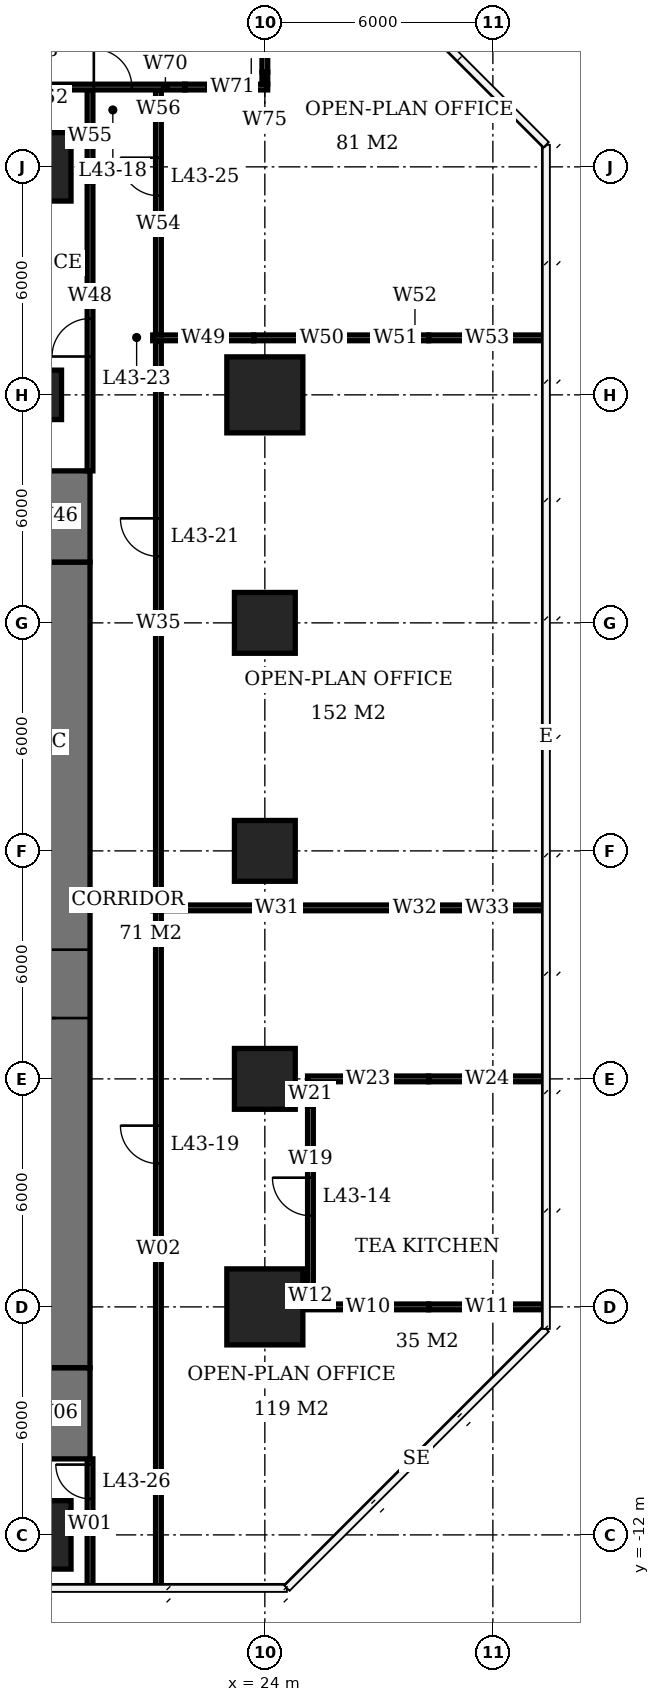
"""IFC4 building model, lengths in metres.
Left out: names, types, materials, properties, quantities, classifications, styles, units other than length and angle.
Written with IfcOpenShell. Run it as: python <this file> out.ifc"""

import sys

from ifc_helpers import new_model, si_unit, direction, frame, frame_2d, origin, origin_2d, place, context, subcontext, project, spatial, rectangle, extrude, element, fill, save


model = new_model("IFC4")
c1 = context("Model", 3, precision=1e-05, world=origin(), true_north=direction((0.0, 1.0)))
c2 = subcontext(c1, "Body", "Model", "MODEL_VIEW")
j1 = project(units=[si_unit("LENGTHUNIT", "METRE"), si_unit("PLANEANGLEUNIT", "RADIAN")], contexts=[c1])
p1 = place(None, origin())
s1 = spatial("IfcSite", under=j1, at=p1, CompositionType="ELEMENT")
p2 = place(p1, origin())
s2 = spatial("IfcBuilding", under=s1, at=p2, CompositionType="ELEMENT")
p3 = place(p2, frame((0.0, 0.0, 177.2)))
s3 = spatial("IfcBuildingStorey", under=s2, at=p3, CompositionType="ELEMENT", Elevation=177.2)
p4 = place(p3, frame((18.0, -12.0, 0.0), z_axis=(0.0, 0.0, 1.0), x_axis=(1.0, 0.0, 0.0)))
e1 = element("IfcColumn", 1, at=p4, inside=s3, PredefinedType="COLUMN", context=c2, shape_type="SweptSolid", body=[
    extrude(rectangle(XDim=1.8, YDim=1.8, at=origin_2d()), origin(), (0.0, 0.0, 1.0), 3.9),
])
p5 = place(p3, frame((18.0, 18.0, 0.0), z_axis=(0.0, 0.0, 1.0), x_axis=(1.0, 0.0, 0.0)))
e2 = element("IfcColumn", 2, at=p5, inside=s3, PredefinedType="COLUMN", context=c2, shape_type="SweptSolid", body=[
    extrude(rectangle(XDim=1.3, YDim=1.3, at=origin_2d()), origin(), (0.0, 0.0, 1.0), 3.9),
])
p6 = place(p3, frame((18.0, 24.0, 0.0), z_axis=(0.0, 0.0, 1.0), x_axis=(1.0, 0.0, 0.0)))
e3 = element("IfcColumn", 3, at=p6, inside=s3, PredefinedType="COLUMN", context=c2, shape_type="SweptSolid", body=[
    extrude(rectangle(XDim=1.8, YDim=1.8, at=origin_2d()), origin(), (0.0, 0.0, 1.0), 3.9),
])
p7 = place(p3, frame((24.0, -6.0, 0.0), z_axis=(0.0, 0.0, 1.0), x_axis=(1.0, 0.0, 0.0)))
e4 = element("IfcColumn", 4, at=p7, inside=s3, PredefinedType="COLUMN", context=c2, shape_type="SweptSolid", body=[
    extrude(rectangle(XDim=2.0, YDim=2.0, at=origin_2d()), origin(), (0.0, 0.0, 1.0), 3.9),
])
for number, where, z_axis, x_axis in (
    (5, (24.0, 0.0, 0.0), (0.0, 0.0, 1.0), (1.0, 0.0, 0.0)),
    (6, (24.0, 6.0, 0.0), (0.0, 0.0, 1.0), (1.0, 0.0, 0.0)),
    (7, (24.0, 12.0, 0.0), (0.0, 0.0, 1.0), (1.0, 0.0, 0.0)),
):
    element("IfcColumn", number, at=place(p3, frame(where, z_axis=z_axis, x_axis=x_axis)), inside=s3, PredefinedType="COLUMN", context=c2, shape_type="SweptSolid", body=[
        extrude(rectangle(XDim=1.6, YDim=1.6, at=origin_2d()), origin(), (0.0, 0.0, 1.0), 3.9),
    ])
p8 = place(p3, frame((24.0, 18.0, 0.0), z_axis=(0.0, 0.0, 1.0), x_axis=(1.0, 0.0, 0.0)))
e8 = element("IfcColumn", 8, at=p8, inside=s3, PredefinedType="COLUMN", context=c2, shape_type="SweptSolid", body=[
    extrude(rectangle(XDim=2.0, YDim=2.0, at=origin_2d()), origin(), (0.0, 0.0, 1.0), 3.9),
])
p9 = place(p3, frame((18.5, -7.6, 0.0), z_axis=(0.0, 0.0, 1.0), x_axis=(0.0, 1.0, 0.0)))
e9 = element("IfcWall", 9, at=p9, inside=s3, PredefinedType="SHEAR", context=c2, shape_type="SweptSolid", body=[
    extrude(rectangle(XDim=21.2, YDim=1.8, at=frame_2d((10.6, 0.0))), origin(), (0.0, 0.0, 1.0), 3.9),
])
p10 = place(p9, frame((9.2, 0.0, 0.0)))
e10 = element("IfcOpeningElement", 10, at=p10, cuts=e9, PredefinedType="OPENING", context=c2, shape_type="SweptSolid", body=[
    extrude(rectangle(XDim=1.8, YDim=2.4, at=frame_2d((0.9, 1.2))), frame((0.0, 0.91, 0.0), z_axis=(0.0, -1.0, 0.0), x_axis=(1.0, 0.0, 0.0)), (0.0, 0.0, 1.0), 1.82),
])
for number, where, z_axis, x_axis in (
    (11, (18.5, -10.0, 0.0), (0.0, 0.0, 1.0), (0.0, 1.0, 0.0)),
    (12, (18.5, 13.6, 0.0), (0.0, 0.0, 1.0), (0.0, 1.0, 0.0)),
):
    element("IfcWall", number, at=place(p3, frame(where, z_axis=z_axis, x_axis=x_axis)), inside=s3, PredefinedType="SHEAR", context=c2, shape_type="SweptSolid", body=[
        extrude(rectangle(XDim=2.4, YDim=1.8, at=frame_2d((1.2, 0.0))), origin(), (0.0, 0.0, 1.0), 3.9),
    ])
p11 = place(p3, frame((25.125, -6.0, 0.0), z_axis=(0.0, 0.0, 1.0), x_axis=(1.0, 0.0, 0.0)))
e13 = element("IfcWall", 13, at=p11, inside=s3, PredefinedType="PARTITIONING", context=c2, shape_type="SweptSolid", body=[
    extrude(rectangle(XDim=3.185, YDim=0.15, at=frame_2d((1.593, 0.0))), origin(), (0.0, 0.0, 1.0), 2.65),
])
p12 = place(p3, frame((28.31, -6.0, 0.0), z_axis=(0.0, 0.0, 1.0), x_axis=(1.0, 0.0, 0.0)))
e14 = element("IfcWall", 14, at=p12, inside=s3, PredefinedType="PARTITIONING", context=c2, shape_type="SweptSolid", body=[
    extrude(rectangle(XDim=3.09, YDim=0.15, at=frame_2d((1.545, 0.0))), origin(), (0.0, 0.0, 1.0), 3.65),
])
p13 = place(p3, frame((25.125, 0.0, 0.0), z_axis=(0.0, 0.0, 1.0), x_axis=(1.0, 0.0, 0.0)))
e15 = element("IfcWall", 15, at=p13, inside=s3, PredefinedType="PARTITIONING", context=c2, shape_type="SweptSolid", body=[
    extrude(rectangle(XDim=3.185, YDim=0.15, at=frame_2d((1.593, 0.0))), origin(), (0.0, 0.0, 1.0), 2.65),
])
p14 = place(p3, frame((28.31, 0.0, 0.0), z_axis=(0.0, 0.0, 1.0), x_axis=(1.0, 0.0, 0.0)))
e16 = element("IfcWall", 16, at=p14, inside=s3, PredefinedType="PARTITIONING", context=c2, shape_type="SweptSolid", body=[
    extrude(rectangle(XDim=3.09, YDim=0.15, at=frame_2d((1.545, 0.0))), origin(), (0.0, 0.0, 1.0), 3.65),
])
p15 = place(p3, frame((18.075, 26.1, 0.0), z_axis=(0.0, 0.0, 1.0), x_axis=(1.0, 0.0, 0.0)))
e17 = element("IfcWall", 17, at=p15, inside=s3, PredefinedType="PARTITIONING", context=c2, shape_type="SweptSolid", body=[
    extrude(rectangle(XDim=3.817, YDim=0.15, at=frame_2d((1.909, 0.0))), origin(), (0.0, 0.0, 1.0), 2.65),
])
p16 = place(p15, frame((1.425, 0.0, 0.0)))
e18 = element("IfcOpeningElement", 18, at=p16, cuts=e17, PredefinedType="OPENING", context=c2, shape_type="SweptSolid", body=[
    extrude(rectangle(XDim=1.0, YDim=2.1, at=frame_2d((0.5, 1.05))), frame((0.0, 0.085, 0.0), z_axis=(0.0, -1.0, 0.0), x_axis=(1.0, 0.0, 0.0)), (0.0, 0.0, 1.0), 0.17),
])
p17 = place(p3, frame((21.892, 26.1, 0.0), z_axis=(0.0, 0.0, 1.0), x_axis=(1.0, 0.0, 0.0)))
e19 = element("IfcWall", 19, at=p17, inside=s3, PredefinedType="PARTITIONING", context=c2, shape_type="SweptSolid", body=[
    extrude(rectangle(XDim=1.318, YDim=0.15, at=frame_2d((0.659, 0.0))), origin(), (0.0, 0.0, 1.0), 3.65),
])
p18 = place(p3, frame((23.21, 26.1, 0.0), z_axis=(0.0, 0.0, 1.0), x_axis=(1.0, 0.0, 0.0)))
e20 = element("IfcWall", 20, at=p18, inside=s3, PredefinedType="PARTITIONING", context=c2, shape_type="SweptSolid", body=[
    extrude(rectangle(XDim=0.865, YDim=0.15, at=frame_2d((0.433, 0.0))), origin(), (0.0, 0.0, 1.0), 2.65),
])
p19 = place(p3, frame((24.0, 26.175, 0.0), z_axis=(0.0, 0.0, 1.0), x_axis=(0.0, 1.0, 0.0)))
e21 = element("IfcWall", 21, at=p19, inside=s3, PredefinedType="PARTITIONING", context=c2, shape_type="SweptSolid", body=[
    extrude(rectangle(XDim=0.315, YDim=0.15, at=frame_2d((0.157, 0.0))), origin(), (0.0, 0.0, 1.0), 2.65),
])
p20 = place(p3, frame((24.0, 26.49, 0.0), z_axis=(0.0, 0.0, 1.0), x_axis=(0.0, 1.0, 0.0)))
e22 = element("IfcWall", 22, at=p20, inside=s3, PredefinedType="PARTITIONING", context=c2, shape_type="SweptSolid", body=[
    extrude(rectangle(XDim=1.718, YDim=0.15, at=frame_2d((0.859, 0.0))), origin(), (0.0, 0.0, 1.0), 3.65),
])
p21 = place(p3, frame((25.2, -5.925, 0.0), z_axis=(0.0, 0.0, 1.0), x_axis=(0.0, 1.0, 0.0)))
e23 = element("IfcWall", 23, at=p21, inside=s3, PredefinedType="PARTITIONING", context=c2, shape_type="SweptSolid", body=[
    extrude(rectangle(XDim=0.435, YDim=0.15, at=frame_2d((0.218, 0.0))), origin(), (0.0, 0.0, 1.0), 2.65),
])
p22 = place(p3, frame((25.2, -5.49, 0.0), z_axis=(0.0, 0.0, 1.0), x_axis=(0.0, 1.0, 0.0)))
e24 = element("IfcWall", 24, at=p22, inside=s3, PredefinedType="PARTITIONING", context=c2, shape_type="SweptSolid", body=[
    extrude(rectangle(XDim=4.78, YDim=0.15, at=frame_2d((2.39, 0.0))), origin(), (0.0, 0.0, 1.0), 3.65),
])
p23 = place(p22, frame((1.89, 0.0, 0.0)))
e25 = element("IfcOpeningElement", 25, at=p23, cuts=e24, PredefinedType="OPENING", context=c2, shape_type="SweptSolid", body=[
    extrude(rectangle(XDim=1.0, YDim=2.1, at=frame_2d((0.5, 1.05))), frame((0.0, 0.085, 0.0), z_axis=(0.0, -1.0, 0.0), x_axis=(1.0, 0.0, 0.0)), (0.0, 0.0, 1.0), 0.17),
])
p24 = place(p3, frame((25.2, -0.71, 0.0), z_axis=(0.0, 0.0, 1.0), x_axis=(0.0, 1.0, 0.0)))
e26 = element("IfcWall", 26, at=p24, inside=s3, PredefinedType="PARTITIONING", context=c2, shape_type="SweptSolid", body=[
    extrude(rectangle(XDim=0.635, YDim=0.15, at=frame_2d((0.317, 0.0))), origin(), (0.0, 0.0, 1.0), 2.65),
])
p25 = place(p3, frame((19.4, -13.4, 0.0), z_axis=(0.0, 0.0, 1.0), x_axis=(0.0, 1.0, 0.0)))
e27 = element("IfcWall", 27, at=p25, inside=s3, PredefinedType="PARTITIONING", context=c2, shape_type="SweptSolid", body=[
    extrude(rectangle(XDim=3.4, YDim=0.15, at=frame_2d((1.7, 0.0))), origin(), (0.0, 0.0, 1.0), 3.65),
])
p26 = place(p25, frame((2.35, 0.0, 0.0)))
e28 = element("IfcOpeningElement", 28, at=p26, cuts=e27, PredefinedType="OPENING", context=c2, shape_type="SweptSolid", body=[
    extrude(rectangle(XDim=0.9, YDim=2.1, at=frame_2d((0.45, 1.05))), frame((0.0, 0.085, 0.0), z_axis=(0.0, -1.0, 0.0), x_axis=(1.0, 0.0, 0.0)), (0.0, 0.0, 1.0), 0.17),
])
p27 = place(p3, frame((19.4, 16.0, 0.0), z_axis=(0.0, 0.0, 1.0), x_axis=(0.0, 1.0, 0.0)))
e29 = element("IfcWall", 29, at=p27, inside=s3, PredefinedType="PARTITIONING", context=c2, shape_type="SweptSolid", body=[
    extrude(rectangle(XDim=7.608, YDim=0.15, at=frame_2d((3.804, 0.0))), origin(), (0.0, 0.0, 1.0), 3.65),
])
p28 = place(p27, frame((3.009, 0.0, 0.0)))
e30 = element("IfcOpeningElement", 30, at=p28, cuts=e29, PredefinedType="OPENING", context=c2, shape_type="SweptSolid", body=[
    extrude(rectangle(XDim=1.0, YDim=2.1, at=frame_2d((0.5, 1.05))), frame((0.0, 0.085, 0.0), z_axis=(0.0, -1.0, 0.0), x_axis=(1.0, 0.0, 0.0)), (0.0, 0.0, 1.0), 0.17),
])
p29 = place(p3, frame((19.4, 23.608, 0.0), z_axis=(0.0, 0.0, 1.0), x_axis=(0.0, 1.0, 0.0)))
e31 = element("IfcWall", 31, at=p29, inside=s3, PredefinedType="PARTITIONING", context=c2, shape_type="SweptSolid", body=[
    extrude(rectangle(XDim=2.417, YDim=0.15, at=frame_2d((1.208, 0.0))), origin(), (0.0, 0.0, 1.0), 2.65),
])
p30 = place(p3, frame((21.2, -13.4, 0.0), z_axis=(0.0, 0.0, 1.0), x_axis=(0.0, 1.0, 0.0)))
e32 = element("IfcWall", 32, at=p30, inside=s3, PredefinedType="PARTITIONING", context=c2, shape_type="SweptSolid", body=[
    extrude(rectangle(XDim=17.825, YDim=0.15, at=frame_2d((8.913, 0.0))), origin(), (0.0, 0.0, 1.0), 3.65),
])
p31 = place(p30, frame((11.17, 0.0, 0.0)))
e33 = element("IfcOpeningElement", 33, at=p31, cuts=e32, PredefinedType="OPENING", context=c2, shape_type="SweptSolid", body=[
    extrude(rectangle(XDim=1.0, YDim=2.1, at=frame_2d((0.5, 1.05))), frame((0.0, 0.085, 0.0), z_axis=(0.0, -1.0, 0.0), x_axis=(1.0, 0.0, 0.0)), (0.0, 0.0, 1.0), 0.17),
])
p32 = place(p3, frame((21.2, 4.575, 0.0), z_axis=(0.0, 0.0, 1.0), x_axis=(0.0, 1.0, 0.0)))
e34 = element("IfcWall", 34, at=p32, inside=s3, PredefinedType="PARTITIONING", context=c2, shape_type="SweptSolid", body=[
    extrude(rectangle(XDim=14.85, YDim=0.15, at=frame_2d((7.425, 0.0))), origin(), (0.0, 0.0, 1.0), 3.65),
])
p33 = place(p32, frame((9.175, 0.0, 0.0)))
e35 = element("IfcOpeningElement", 35, at=p33, cuts=e34, PredefinedType="OPENING", context=c2, shape_type="SweptSolid", body=[
    extrude(rectangle(XDim=1.0, YDim=2.1, at=frame_2d((0.5, 1.05))), frame((0.0, 0.085, 0.0), z_axis=(0.0, -1.0, 0.0), x_axis=(1.0, 0.0, 0.0)), (0.0, 0.0, 1.0), 0.17),
])
p34 = place(p3, frame((21.05, 4.5, 0.0), z_axis=(0.0, 0.0, 1.0), x_axis=(1.0, 0.0, 0.0)))
e36 = element("IfcWall", 36, at=p34, inside=s3, PredefinedType="PARTITIONING", context=c2, shape_type="SweptSolid", body=[
    extrude(rectangle(XDim=6.54, YDim=0.15, at=frame_2d((3.27, 0.0))), origin(), (0.0, 0.0, 1.0), 3.65),
])
p35 = place(p3, frame((27.59, 4.5, 0.0), z_axis=(0.0, 0.0, 1.0), x_axis=(1.0, 0.0, 0.0)))
e37 = element("IfcWall", 37, at=p35, inside=s3, PredefinedType="PARTITIONING", context=c2, shape_type="SweptSolid", body=[
    extrude(rectangle(XDim=0.72, YDim=0.15, at=frame_2d((0.36, 0.0))), origin(), (0.0, 0.0, 1.0), 2.65),
])
p36 = place(p3, frame((28.31, 4.5, 0.0), z_axis=(0.0, 0.0, 1.0), x_axis=(1.0, 0.0, 0.0)))
e38 = element("IfcWall", 38, at=p36, inside=s3, PredefinedType="PARTITIONING", context=c2, shape_type="SweptSolid", body=[
    extrude(rectangle(XDim=3.09, YDim=0.15, at=frame_2d((1.545, 0.0))), origin(), (0.0, 0.0, 1.0), 3.65),
])
p37 = place(p3, frame((21.2, 19.575, 0.0), z_axis=(0.0, 0.0, 1.0), x_axis=(0.0, 1.0, 0.0)))
e39 = element("IfcWall", 39, at=p37, inside=s3, PredefinedType="PARTITIONING", context=c2, shape_type="SweptSolid", body=[
    extrude(rectangle(XDim=5.833, YDim=0.15, at=frame_2d((2.917, 0.0))), origin(), (0.0, 0.0, 1.0), 3.65),
])
p38 = place(p37, frame((3.666, 0.0, 0.0)))
e40 = element("IfcOpeningElement", 40, at=p38, cuts=e39, PredefinedType="OPENING", context=c2, shape_type="SweptSolid", body=[
    extrude(rectangle(XDim=1.0, YDim=2.1, at=frame_2d((0.5, 1.05))), frame((0.0, 0.085, 0.0), z_axis=(0.0, -1.0, 0.0), x_axis=(1.0, 0.0, 0.0)), (0.0, 0.0, 1.0), 0.17),
])
p39 = place(p3, frame((21.2, 25.408, 0.0), z_axis=(0.0, 0.0, 1.0), x_axis=(0.0, 1.0, 0.0)))
e41 = element("IfcWall", 41, at=p39, inside=s3, PredefinedType="PARTITIONING", context=c2, shape_type="SweptSolid", body=[
    extrude(rectangle(XDim=0.617, YDim=0.15, at=frame_2d((0.309, 0.0))), origin(), (0.0, 0.0, 1.0), 2.65),
])
p40 = place(p3, frame((21.05, 19.5, 0.0), z_axis=(0.0, 0.0, 1.0), x_axis=(1.0, 0.0, 0.0)))
e42 = element("IfcWall", 42, at=p40, inside=s3, PredefinedType="PARTITIONING", context=c2, shape_type="SweptSolid", body=[
    extrude(rectangle(XDim=2.658, YDim=0.15, at=frame_2d((1.329, 0.0))), origin(), (0.0, 0.0, 1.0), 3.65),
])
p41 = place(p3, frame((23.708, 19.5, 0.0), z_axis=(0.0, 0.0, 1.0), x_axis=(1.0, 0.0, 0.0)))
e43 = element("IfcWall", 43, at=p41, inside=s3, PredefinedType="PARTITIONING", context=c2, shape_type="SweptSolid", body=[
    extrude(rectangle(XDim=3.584, YDim=0.15, at=frame_2d((1.792, 0.0))), origin(), (0.0, 0.0, 1.0), 2.65),
])
p42 = place(p3, frame((27.292, 19.5, 0.0), z_axis=(0.0, 0.0, 1.0), x_axis=(1.0, 0.0, 0.0)))
e44 = element("IfcWall", 44, at=p42, inside=s3, PredefinedType="PARTITIONING", context=c2, shape_type="SweptSolid", body=[
    extrude(rectangle(XDim=0.298, YDim=0.15, at=frame_2d((0.149, 0.0))), origin(), (0.0, 0.0, 1.0), 3.65),
])
p43 = place(p3, frame((27.59, 19.5, 0.0), z_axis=(0.0, 0.0, 1.0), x_axis=(1.0, 0.0, 0.0)))
e45 = element("IfcWall", 45, at=p43, inside=s3, PredefinedType="PARTITIONING", context=c2, shape_type="SweptSolid", body=[
    extrude(rectangle(XDim=0.72, YDim=0.15, at=frame_2d((0.36, 0.0))), origin(), (0.0, 0.0, 1.0), 2.65),
])
p44 = place(p3, frame((28.31, 19.5, 0.0), z_axis=(0.0, 0.0, 1.0), x_axis=(1.0, 0.0, 0.0)))
e46 = element("IfcWall", 46, at=p44, inside=s3, PredefinedType="PARTITIONING", context=c2, shape_type="SweptSolid", body=[
    extrude(rectangle(XDim=3.09, YDim=0.15, at=frame_2d((1.545, 0.0))), origin(), (0.0, 0.0, 1.0), 3.65),
])
p45 = place(p10, origin())
e47 = element("IfcDoor", 47, at=p45, inside=s3, OperationType="DOUBLE_DOOR_SINGLE_SWING", PredefinedType="DOOR", context=c2, shape_type="SweptSolid", body=[
    extrude(rectangle(XDim=1.8, YDim=2.4, at=frame_2d((0.9, 1.2))), frame((0.0, 0.025, 0.0), z_axis=(0.0, -1.0, 0.0), x_axis=(1.0, 0.0, 0.0)), (0.0, 0.0, 1.0), 0.05),
])
fill(e10, e47)
p46 = place(p23, origin())
e48 = element("IfcDoor", 48, at=p46, inside=s3, OperationType="SINGLE_SWING_RIGHT", PredefinedType="DOOR", context=c2, shape_type="SweptSolid", body=[
    extrude(rectangle(XDim=1.0, YDim=2.1, at=frame_2d((0.5, 1.05))), frame((0.0, 0.025, 0.0), z_axis=(0.0, -1.0, 0.0), x_axis=(1.0, 0.0, 0.0)), (0.0, 0.0, 1.0), 0.05),
])
fill(e25, e48)
p47 = place(p16, origin())
e49 = element("IfcDoor", 49, at=p47, inside=s3, OperationType="SINGLE_SWING_LEFT", PredefinedType="DOOR", context=c2, shape_type="SweptSolid", body=[
    extrude(rectangle(XDim=1.0, YDim=2.1, at=frame_2d((0.5, 1.05))), frame((0.0, 0.025, 0.0), z_axis=(0.0, -1.0, 0.0), x_axis=(1.0, 0.0, 0.0)), (0.0, 0.0, 1.0), 0.05),
])
fill(e18, e49)
p48 = place(p31, origin())
e50 = element("IfcDoor", 50, at=p48, inside=s3, OperationType="SINGLE_SWING_RIGHT", PredefinedType="DOOR", context=c2, shape_type="SweptSolid", body=[
    extrude(rectangle(XDim=1.0, YDim=2.1, at=frame_2d((0.5, 1.05))), frame((0.0, 0.025, 0.0), z_axis=(0.0, -1.0, 0.0), x_axis=(1.0, 0.0, 0.0)), (0.0, 0.0, 1.0), 0.05),
])
fill(e33, e50)
p49 = place(p33, origin())
e51 = element("IfcDoor", 51, at=p49, inside=s3, OperationType="SINGLE_SWING_RIGHT", PredefinedType="DOOR", context=c2, shape_type="SweptSolid", body=[
    extrude(rectangle(XDim=1.0, YDim=2.1, at=frame_2d((0.5, 1.05))), frame((0.0, 0.025, 0.0), z_axis=(0.0, -1.0, 0.0), x_axis=(1.0, 0.0, 0.0)), (0.0, 0.0, 1.0), 0.05),
])
fill(e35, e51)
p50 = place(p28, origin())
e52 = element("IfcDoor", 52, at=p50, inside=s3, OperationType="SINGLE_SWING_LEFT", PredefinedType="DOOR", context=c2, shape_type="SweptSolid", body=[
    extrude(rectangle(XDim=1.0, YDim=2.1, at=frame_2d((0.5, 1.05))), frame((0.0, 0.025, 0.0), z_axis=(0.0, -1.0, 0.0), x_axis=(1.0, 0.0, 0.0)), (0.0, 0.0, 1.0), 0.05),
])
fill(e30, e52)
p51 = place(p38, origin())
e53 = element("IfcDoor", 53, at=p51, inside=s3, OperationType="SINGLE_SWING_RIGHT", PredefinedType="DOOR", context=c2, shape_type="SweptSolid", body=[
    extrude(rectangle(XDim=1.0, YDim=2.1, at=frame_2d((0.5, 1.05))), frame((0.0, 0.025, 0.0), z_axis=(0.0, -1.0, 0.0), x_axis=(1.0, 0.0, 0.0)), (0.0, 0.0, 1.0), 0.05),
])
fill(e40, e53)
p52 = place(p26, origin())
e54 = element("IfcDoor", 54, at=p52, inside=s3, OperationType="SINGLE_SWING_RIGHT", PredefinedType="DOOR", context=c2, shape_type="SweptSolid", body=[
    extrude(rectangle(XDim=0.9, YDim=2.1, at=frame_2d((0.45, 1.05))), frame((0.0, 0.025, 0.0), z_axis=(0.0, -1.0, 0.0), x_axis=(1.0, 0.0, 0.0)), (0.0, 0.0, 1.0), 0.05),
])
fill(e28, e54)
save(model, sys.argv[1])
